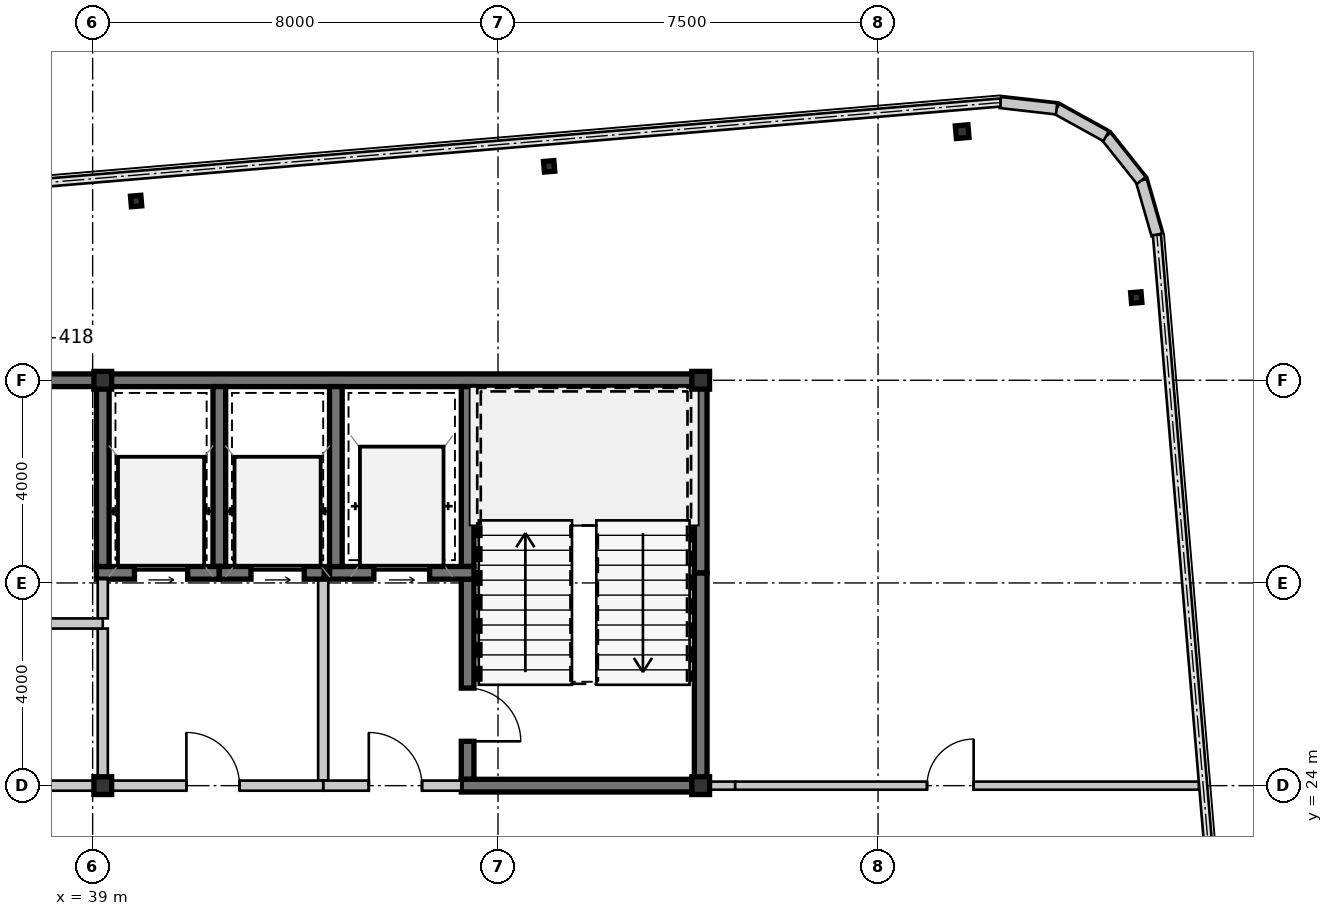
"""IFC4 building model, lengths in metres.
Left out: names, types, materials, properties, quantities, classifications, styles, units other than length and angle.
Written with IfcOpenShell. Run it as: python <this file> out.ifc"""

import sys

from ifc_helpers import new_model, si_unit, direction, frame, frame_2d, origin, origin_2d, place, context, subcontext, project, spatial, rectangle, hollow_rectangle, i_section, extrude, source, transform, mapped, element, fill, save


model = new_model("IFC4")
c1 = context("Model", 3, precision=1e-05, world=origin(), true_north=direction((0.0, 1.0)))
c2 = subcontext(c1, "Body", "Model", "MODEL_VIEW")
j1 = project(units=[si_unit("LENGTHUNIT", "METRE"), si_unit("PLANEANGLEUNIT", "RADIAN")], contexts=[c1])
p1 = place(None, origin())
s1 = spatial("IfcSite", under=j1, at=p1, CompositionType="ELEMENT")
p2 = place(p1, origin())
s2 = spatial("IfcBuilding", under=s1, at=p2, CompositionType="ELEMENT")
p3 = place(p2, frame((0.0, 0.0, 172.55)))
s3 = spatial("IfcBuildingStorey", under=s2, at=p3, CompositionType="ELEMENT", Elevation=172.55)
m1 = source(origin(), c2, "Body", "SweptSolid", [
    extrude(hollow_rectangle(XDim=0.35, YDim=0.35, WallThickness=0.016, at=origin_2d()), origin(), (0.0, 0.0, 1.0), 3.15),
])
for number, where, z_axis, x_axis in (
    (1, (39.2, 24.0, 0.0), (0.0, 0.0, 1.0), (1.0, 0.0, 0.0)),
    (2, (51.0, 24.0, 0.0), (0.0, 0.0, 1.0), (1.0, 0.0, 0.0)),
    (3, (39.2, 32.0, 0.0), (0.0, 0.0, 1.0), (1.0, 0.0, 0.0)),
    (4, (51.0, 32.0, 0.0), (0.0, 0.0, 1.0), (1.0, 0.0, 0.0)),
):
    element("IfcColumn", number, at=place(p3, frame(where, z_axis=z_axis, x_axis=x_axis)), inside=s3, PredefinedType="COLUMN", context=c2, shape_type="MappedRepresentation", body=[
        mapped(m1, transform((0.0, 0.0, 0.0), scale=1.0)),
    ])
m2 = source(origin(), c2, "Body", "SweptSolid", [
    extrude(i_section(OverallWidth=0.205, OverallDepth=0.21, WebThickness=0.009, FlangeThickness=0.014, at=origin_2d()), origin(), (0.0, 0.0, 1.0), 3.15),
])
for number, where, z_axis, x_axis in (
    (5, (39.858, 35.537, 0.0), (0.0, 0.0, 1.0), (0.996, 0.084, 0.0)),
    (6, (48.009, 36.221, 0.0), (0.0, 0.0, 1.0), (0.996, 0.084, 0.0)),
):
    element("IfcColumn", number, at=place(p3, frame(where, z_axis=z_axis, x_axis=x_axis)), inside=s3, PredefinedType="COLUMN", context=c2, shape_type="MappedRepresentation", body=[
        mapped(m2, transform((0.0, 0.0, 0.0), scale=1.0)),
    ])
m3 = source(origin(), c2, "Body", "SweptSolid", [
    extrude(hollow_rectangle(XDim=0.25, YDim=0.25, WallThickness=0.01, at=origin_2d()), origin(), (0.0, 0.0, 1.0), 3.15),
])
p4 = place(p3, frame((56.16, 36.906, 0.0), z_axis=(0.0, 0.0, 1.0), x_axis=(0.99649285925, 0.083677843332, 0.0)))
e7 = element("IfcColumn", 7, at=p4, inside=s3, PredefinedType="COLUMN", context=c2, shape_type="MappedRepresentation", body=[
    mapped(m3, transform((0.0, 0.0, 0.0), scale=1.0)),
])
p5 = place(p3, frame((59.596, 33.632, 0.0), z_axis=(0.0, 0.0, 1.0), x_axis=(0.99649285925, 0.083677843332, 0.0)))
e8 = element("IfcColumn", 8, at=p5, inside=s3, PredefinedType="COLUMN", context=c2, shape_type="MappedRepresentation", body=[
    mapped(m2, transform((0.0, 0.0, 0.0), scale=1.0)),
])
m4 = source(origin(), c2, "Body", "SweptSolid", [
    extrude(rectangle(XDim=1.116, YDim=0.22, at=frame_2d((0.558, 0.0))), origin(), (0.0, 0.0, 1.0), 2.93),
])
for number, where, z_axis, x_axis in (
    (9, (60.004, 34.87, 0.0), (0.0, 0.0, 1.0), (-0.277, 0.961, 0.0)),
    (10, (59.696, 35.943, 0.0), (0.0, 0.0, 1.0), (-0.623, 0.782, 0.0)),
    (11, (59.0, 36.816, 0.0), (0.0, 0.0, 1.0), (-0.875, 0.484, 0.0)),
    (12, (58.024, 37.356, 0.0), (0.0, 0.0, 1.0), (-0.994, 0.112, 0.0)),
):
    element("IfcWall", number, at=place(p3, frame(where, z_axis=z_axis, x_axis=x_axis)), inside=s3, PredefinedType="SOLIDWALL", context=c2, shape_type="MappedRepresentation", body=[
        mapped(m4, transform((0.0, 0.0, 0.0), scale=1.0)),
    ])
m5 = source(origin(), c2, "Body", "SweptSolid", [
    extrude(rectangle(XDim=11.2, YDim=0.25, at=frame_2d((5.6, 0.0))), origin(), (0.0, 0.0, 1.0), 2.93),
])
p6 = place(p3, frame((28.0, 32.0, 0.0), z_axis=(0.0, 0.0, 1.0), x_axis=(1.0, 0.0, 0.0)))
e13 = element("IfcWall", 13, at=p6, inside=s3, PredefinedType="SHEAR", context=c2, shape_type="MappedRepresentation", body=[
    mapped(m5, transform((0.0, 0.0, 0.0), scale=1.0)),
])
m6 = source(origin(), c2, "Body", "SweptSolid", [
    extrude(rectangle(XDim=11.925, YDim=0.25, at=frame_2d((5.962, 0.0))), origin(), (0.0, 0.0, 1.0), 2.93),
])
p7 = place(p3, frame((39.2, 32.0, 0.0), z_axis=(0.0, 0.0, 1.0), x_axis=(1.0, 0.0, 0.0)))
e14 = element("IfcWall", 14, at=p7, inside=s3, PredefinedType="SHEAR", context=c2, shape_type="MappedRepresentation", body=[
    mapped(m6, transform((0.0, 0.0, 0.0), scale=1.0)),
])
m7 = source(origin(), c2, "Body", "SweptSolid", [
    extrude(rectangle(XDim=4.075, YDim=0.25, at=frame_2d((2.038, 0.0))), origin(), (0.0, 0.0, 1.0), 2.93),
])
p8 = place(p3, frame((51.0, 24.125, 0.0), z_axis=(0.0, 0.0, 1.0), x_axis=(0.0, 1.0, 0.0)))
e15 = element("IfcWall", 15, at=p8, inside=s3, PredefinedType="SHEAR", context=c2, shape_type="MappedRepresentation", body=[
    mapped(m7, transform((0.0, 0.0, 0.0), scale=1.0)),
])
m8 = source(origin(), c2, "Body", "SweptSolid", [
    extrude(rectangle(XDim=3.675, YDim=0.25, at=frame_2d((1.837, 0.0))), origin(), (0.0, 0.0, 1.0), 2.93),
])
p9 = place(p3, frame((51.0, 28.2, 0.0), z_axis=(0.0, 0.0, 1.0), x_axis=(0.0, 1.0, 0.0)))
e16 = element("IfcWall", 16, at=p9, inside=s3, PredefinedType="SHEAR", context=c2, shape_type="MappedRepresentation", body=[
    mapped(m8, transform((0.0, 0.0, 0.0), scale=1.0)),
])
m9 = source(origin(), c2, "Body", "SweptSolid", [
    extrude(rectangle(XDim=3.55, YDim=0.25, at=frame_2d((1.775, 0.0))), origin(), (0.0, 0.0, 1.0), 2.93),
])
p10 = place(p3, frame((46.4, 31.875, 0.0), z_axis=(0.0, 0.0, 1.0), x_axis=(0.0, -1.0, 0.0)))
e17 = element("IfcWall", 17, at=p10, inside=s3, PredefinedType="SHEAR", context=c2, shape_type="MappedRepresentation", body=[
    mapped(m9, transform((0.0, 0.0, 0.0), scale=1.0)),
])
m10 = source(origin(), c2, "Body", "SweptSolid", [
    extrude(rectangle(XDim=3.95, YDim=0.25, at=frame_2d((1.975, 0.0))), origin(), (0.0, 0.0, 1.0), 2.93),
])
p11 = place(p3, frame((46.4, 28.075, 0.0), z_axis=(0.0, 0.0, 1.0), x_axis=(0.0, -1.0, 0.0)))
e18 = element("IfcWall", 18, at=p11, inside=s3, PredefinedType="SHEAR", context=c2, shape_type="MappedRepresentation", body=[
    mapped(m10, transform((0.0, 0.0, 0.0), scale=1.0)),
])
m11 = source(origin(), c2, "Body", "SweptSolid", [
    extrude(rectangle(XDim=1.05, YDim=2.1, at=frame_2d((0.525, 1.05))), frame((0.0, 0.135, 0.0), z_axis=(0.0, -1.0, 0.0), x_axis=(1.0, 0.0, 0.0)), (0.0, 0.0, 1.0), 0.27),
])
p12 = place(p11, frame((2.15, 0.0, 0.0)))
e19 = element("IfcOpeningElement", 19, at=p12, cuts=e18, PredefinedType="OPENING", context=c2, shape_type="MappedRepresentation", body=[
    mapped(m11, transform((0.0, 0.0, 0.0), scale=1.0)),
])
m12 = source(origin(), c2, "Body", "SweptSolid", [
    extrude(rectangle(XDim=4.85, YDim=0.25, at=frame_2d((2.425, 0.0))), origin(), (0.0, 0.0, 1.0), 2.93),
])
p13 = place(p3, frame((46.275, 24.0, 0.0), z_axis=(0.0, 0.0, 1.0), x_axis=(1.0, 0.0, 0.0)))
e20 = element("IfcWall", 20, at=p13, inside=s3, PredefinedType="SHEAR", context=c2, shape_type="MappedRepresentation", body=[
    mapped(m12, transform((0.0, 0.0, 0.0), scale=1.0)),
])
m13 = source(origin(), c2, "Body", "SweptSolid", [
    extrude(rectangle(XDim=2.85, YDim=0.25, at=frame_2d((1.425, 0.0))), origin(), (0.0, 0.0, 1.0), 2.93),
])
p14 = place(p3, frame((43.675, 28.2, 0.0), z_axis=(0.0, 0.0, 1.0), x_axis=(1.0, 0.0, 0.0)))
e21 = element("IfcWall", 21, at=p14, inside=s3, PredefinedType="SHEAR", context=c2, shape_type="MappedRepresentation", body=[
    mapped(m13, transform((0.0, 0.0, 0.0), scale=1.0)),
])
m14 = source(origin(), c2, "Body", "SweptSolid", [
    extrude(rectangle(XDim=1.1, YDim=2.15, at=frame_2d((0.55, 1.075))), frame((0.0, 0.135, 0.0), z_axis=(0.0, -1.0, 0.0), x_axis=(1.0, 0.0, 0.0)), (0.0, 0.0, 1.0), 0.27),
])
p15 = place(p14, frame((0.875, 0.0, 0.0)))
e22 = element("IfcOpeningElement", 22, at=p15, cuts=e21, PredefinedType="OPENING", context=c2, shape_type="MappedRepresentation", body=[
    mapped(m14, transform((0.0, 0.0, 0.0), scale=1.0)),
])
p16 = place(p3, frame((43.8, 31.875, 0.0), z_axis=(0.0, 0.0, 1.0), x_axis=(0.0, -1.0, 0.0)))
e23 = element("IfcWall", 23, at=p16, inside=s3, PredefinedType="SHEAR", context=c2, shape_type="MappedRepresentation", body=[
    mapped(m9, transform((0.0, 0.0, 0.0), scale=1.0)),
])
m15 = source(origin(), c2, "Body", "SweptSolid", [
    extrude(rectangle(XDim=3.975, YDim=0.2, at=frame_2d((1.987, 0.0))), origin(), (0.0, 0.0, 1.0), 2.93),
])
p17 = place(p3, frame((43.55, 28.075, 0.0), z_axis=(0.0, 0.0, 1.0), x_axis=(0.0, -1.0, 0.0)))
e24 = element("IfcWall", 24, at=p17, inside=s3, PredefinedType="SOLIDWALL", context=c2, shape_type="MappedRepresentation", body=[
    mapped(m15, transform((0.0, 0.0, 0.0), scale=1.0)),
])
m16 = source(origin(), c2, "Body", "SweptSolid", [
    extrude(rectangle(XDim=2.725, YDim=0.2, at=frame_2d((1.362, 0.0))), origin(), (0.0, 0.0, 1.0), 2.397),
])
p18 = place(p3, frame((43.55, 24.0, 0.0), z_axis=(0.0, 0.0, 1.0), x_axis=(1.0, 0.0, 0.0)))
e25 = element("IfcWall", 25, at=p18, inside=s3, PredefinedType="SOLIDWALL", context=c2, shape_type="MappedRepresentation", body=[
    mapped(m16, transform((0.0, 0.0, 0.0), scale=1.0)),
])
m17 = source(origin(), c2, "Body", "SweptSolid", [
    extrude(rectangle(XDim=1.05, YDim=2.1, at=frame_2d((0.525, 1.05))), frame((0.0, 0.11, 0.0), z_axis=(0.0, -1.0, 0.0), x_axis=(1.0, 0.0, 0.0)), (0.0, 0.0, 1.0), 0.22),
])
p19 = place(p18, frame((0.9, 0.0, 0.0)))
e26 = element("IfcOpeningElement", 26, at=p19, cuts=e25, PredefinedType="OPENING", context=c2, shape_type="MappedRepresentation", body=[
    mapped(m17, transform((0.0, 0.0, 0.0), scale=1.0)),
])
p20 = place(p3, frame((41.5, 28.325, 0.0), z_axis=(0.0, 0.0, 1.0), x_axis=(0.0, 1.0, 0.0)))
e27 = element("IfcWall", 27, at=p20, inside=s3, PredefinedType="SHEAR", context=c2, shape_type="MappedRepresentation", body=[
    mapped(m9, transform((0.0, 0.0, 0.0), scale=1.0)),
])
m18 = source(origin(), c2, "Body", "SweptSolid", [
    extrude(rectangle(XDim=2.425, YDim=0.25, at=frame_2d((1.212, 0.0))), origin(), (0.0, 0.0, 1.0), 2.93),
])
p21 = place(p3, frame((39.075, 28.2, 0.0), z_axis=(0.0, 0.0, 1.0), x_axis=(1.0, 0.0, 0.0)))
e28 = element("IfcWall", 28, at=p21, inside=s3, PredefinedType="SHEAR", context=c2, shape_type="MappedRepresentation", body=[
    mapped(m18, transform((0.0, 0.0, 0.0), scale=1.0)),
])
m19 = source(origin(), c2, "Body", "SweptSolid", [
    extrude(rectangle(XDim=1.05, YDim=2.15, at=frame_2d((0.525, 1.075))), frame((0.0, 0.135, 0.0), z_axis=(0.0, -1.0, 0.0), x_axis=(1.0, 0.0, 0.0)), (0.0, 0.0, 1.0), 0.27),
])
p22 = place(p21, frame((0.75, 0.0, 0.0)))
e29 = element("IfcOpeningElement", 29, at=p22, cuts=e28, PredefinedType="OPENING", context=c2, shape_type="MappedRepresentation", body=[
    mapped(m19, transform((0.0, 0.0, 0.0), scale=1.0)),
])
p23 = place(p3, frame((39.2, 31.875, 0.0), z_axis=(0.0, 0.0, 1.0), x_axis=(0.0, -1.0, 0.0)))
e30 = element("IfcWall", 30, at=p23, inside=s3, PredefinedType="SHEAR", context=c2, shape_type="MappedRepresentation", body=[
    mapped(m9, transform((0.0, 0.0, 0.0), scale=1.0)),
])
m20 = source(origin(), c2, "Body", "SweptSolid", [
    extrude(rectangle(XDim=2.07, YDim=0.25, at=frame_2d((1.035, 0.0))), origin(), (0.0, 0.0, 1.0), 2.93),
])
p24 = place(p3, frame((41.5, 28.2, 0.0), z_axis=(0.0, 0.0, 1.0), x_axis=(1.0, 0.0, 0.0)))
e31 = element("IfcWall", 31, at=p24, inside=s3, PredefinedType="SHEAR", context=c2, shape_type="MappedRepresentation", body=[
    mapped(m20, transform((0.0, 0.0, 0.0), scale=1.0)),
])
p25 = place(p24, frame((0.625, 0.0, 0.0)))
e32 = element("IfcOpeningElement", 32, at=p25, cuts=e31, PredefinedType="OPENING", context=c2, shape_type="MappedRepresentation", body=[
    mapped(m19, transform((0.0, 0.0, 0.0), scale=1.0)),
])
m21 = source(origin(), c2, "Body", "SweptSolid", [
    extrude(rectangle(XDim=3.0, YDim=0.2, at=frame_2d((1.5, 0.0))), origin(), (0.0, 0.0, 1.0), 2.47),
])
p26 = place(p3, frame((39.2, 24.1, 0.0), z_axis=(0.0, 0.0, 1.0), x_axis=(0.0, 1.0, 0.0)))
e33 = element("IfcWall", 33, at=p26, inside=s3, PredefinedType="SOLIDWALL", context=c2, shape_type="MappedRepresentation", body=[
    mapped(m21, transform((0.0, 0.0, 0.0), scale=1.0)),
])
m22 = source(origin(), c2, "Body", "SweptSolid", [
    extrude(rectangle(XDim=0.775, YDim=0.2, at=frame_2d((0.387, 0.0))), origin(), (0.0, 0.0, 1.0), 2.47),
])
p27 = place(p3, frame((39.2, 27.3, 0.0), z_axis=(0.0, 0.0, 1.0), x_axis=(0.0, 1.0, 0.0)))
e34 = element("IfcWall", 34, at=p27, inside=s3, PredefinedType="SOLIDWALL", context=c2, shape_type="MappedRepresentation", body=[
    mapped(m22, transform((0.0, 0.0, 0.0), scale=1.0)),
])
m23 = source(origin(), c2, "Body", "SweptSolid", [
    extrude(rectangle(XDim=4.35, YDim=0.2, at=frame_2d((2.175, 0.0))), origin(), (0.0, 0.0, 1.0), 2.397),
])
p28 = place(p3, frame((43.55, 24.0, 0.0), z_axis=(0.0, 0.0, 1.0), x_axis=(-1.0, 0.0, 0.0)))
e35 = element("IfcWall", 35, at=p28, inside=s3, PredefinedType="SOLIDWALL", context=c2, shape_type="MappedRepresentation", body=[
    mapped(m23, transform((0.0, 0.0, 0.0), scale=1.0)),
])
p29 = place(p28, frame((1.65, 0.0, 0.0)))
e36 = element("IfcOpeningElement", 36, at=p29, cuts=e35, PredefinedType="OPENING", context=c2, shape_type="MappedRepresentation", body=[
    mapped(m17, transform((0.0, 0.0, 0.0), scale=1.0)),
])
m24 = source(origin(), c2, "Body", "SweptSolid", [
    extrude(rectangle(XDim=4.05, YDim=0.2, at=frame_2d((2.025, 0.0))), origin(), (0.0, 0.0, 1.0), 2.93),
])
p30 = place(p3, frame((35.15, 27.2, 0.0), z_axis=(0.0, 0.0, 1.0), x_axis=(1.0, 0.0, 0.0)))
e37 = element("IfcWall", 37, at=p30, inside=s3, PredefinedType="SOLIDWALL", context=c2, shape_type="MappedRepresentation", body=[
    mapped(m24, transform((0.0, 0.0, 0.0), scale=1.0)),
])
p31 = place(p30, frame((0.42, 0.0, 0.0)))
e38 = element("IfcOpeningElement", 38, at=p31, cuts=e37, PredefinedType="OPENING", context=c2, shape_type="MappedRepresentation", body=[
    mapped(m17, transform((0.0, 0.0, 0.0), scale=1.0)),
])
m25 = source(origin(), c2, "Body", "SweptSolid", [
    extrude(rectangle(XDim=4.05, YDim=0.2, at=frame_2d((2.025, 0.0))), origin(), (0.0, 0.0, 1.0), 2.47),
])
p32 = place(p3, frame((39.2, 24.0, 0.0), z_axis=(0.0, 0.0, 1.0), x_axis=(-1.0, 0.0, 0.0)))
e39 = element("IfcWall", 39, at=p32, inside=s3, PredefinedType="SOLIDWALL", context=c2, shape_type="MappedRepresentation", body=[
    mapped(m25, transform((0.0, 0.0, 0.0), scale=1.0)),
])
p33 = place(p32, frame((1.5, 0.0, 0.0)))
e40 = element("IfcOpeningElement", 40, at=p33, cuts=e39, PredefinedType="OPENING", context=c2, shape_type="MappedRepresentation", body=[
    mapped(m17, transform((0.0, 0.0, 0.0), scale=1.0)),
])
m26 = source(origin(), c2, "Body", "SweptSolid", [
    extrude(rectangle(XDim=0.556, YDim=0.16, at=frame_2d((0.278, 0.0))), origin(), (0.0, 0.0, 1.0), 2.47),
])
p34 = place(p3, frame((51.125, 24.0, 0.0), z_axis=(0.0, 0.0, 1.0), x_axis=(1.0, 0.0, 0.0)))
e41 = element("IfcWall", 41, at=p34, inside=s3, PredefinedType="PARTITIONING", context=c2, shape_type="MappedRepresentation", body=[
    mapped(m26, transform((0.0, 0.0, 0.0), scale=1.0)),
])
m27 = source(origin(), c2, "Body", "SweptSolid", [
    extrude(rectangle(XDim=9.153, YDim=0.16, at=frame_2d((4.576, 0.0))), origin(), (0.0, 0.0, 1.0), 2.93),
])
p35 = place(p3, frame((51.681, 24.0, 0.0), z_axis=(0.0, 0.0, 1.0), x_axis=(1.0, 0.0, 0.0)))
e42 = element("IfcWall", 42, at=p35, inside=s3, PredefinedType="PARTITIONING", context=c2, shape_type="MappedRepresentation", body=[
    mapped(m27, transform((0.0, 0.0, 0.0), scale=1.0)),
])
m28 = source(origin(), c2, "Body", "SweptSolid", [
    extrude(rectangle(XDim=0.92, YDim=2.1, at=frame_2d((0.46, 1.05))), frame((0.0, 0.09, 0.0), z_axis=(0.0, -1.0, 0.0), x_axis=(1.0, 0.0, 0.0)), (0.0, 0.0, 1.0), 0.18),
])
p36 = place(p35, frame((3.786, 0.0, 0.0)))
e43 = element("IfcOpeningElement", 43, at=p36, cuts=e42, PredefinedType="OPENING", context=c2, shape_type="MappedRepresentation", body=[
    mapped(m28, transform((0.0, 0.0, 0.0), scale=1.0)),
])
m29 = source(origin(), c2, "Body", "SweptSolid", [
    extrude(rectangle(XDim=1.05, YDim=2.1, at=frame_2d((0.525, 1.05))), frame((0.0, 0.025, 0.0), z_axis=(0.0, -1.0, 0.0), x_axis=(1.0, 0.0, 0.0)), (0.0, 0.0, 1.0), 0.05),
])
p37 = place(p12, origin())
e44 = element("IfcDoor", 44, at=p37, inside=s3, OperationType="SINGLE_SWING_RIGHT", PredefinedType="DOOR", context=c2, shape_type="MappedRepresentation", body=[
    mapped(m29, transform((0.0, 0.0, 0.0), scale=1.0)),
])
fill(e19, e44)
m30 = source(origin(), c2, "Body", "SweptSolid", [
    extrude(rectangle(XDim=1.1, YDim=2.15, at=frame_2d((0.55, 1.075))), frame((0.0, 0.025, 0.0), z_axis=(0.0, -1.0, 0.0), x_axis=(1.0, 0.0, 0.0)), (0.0, 0.0, 1.0), 0.05),
])
p38 = place(p15, origin())
e45 = element("IfcDoor", 45, at=p38, inside=s3, OperationType="SLIDING_TO_LEFT", PredefinedType="DOOR", context=c2, shape_type="MappedRepresentation", body=[
    mapped(m30, transform((0.0, 0.0, 0.0), scale=1.0)),
])
fill(e22, e45)
p39 = place(p19, origin())
e46 = element("IfcDoor", 46, at=p39, inside=s3, OperationType="SINGLE_SWING_LEFT", PredefinedType="DOOR", context=c2, shape_type="MappedRepresentation", body=[
    mapped(m29, transform((0.0, 0.0, 0.0), scale=1.0)),
])
fill(e26, e46)
m31 = source(origin(), c2, "Body", "SweptSolid", [
    extrude(rectangle(XDim=1.05, YDim=2.15, at=frame_2d((0.525, 1.075))), frame((0.0, 0.025, 0.0), z_axis=(0.0, -1.0, 0.0), x_axis=(1.0, 0.0, 0.0)), (0.0, 0.0, 1.0), 0.05),
])
p40 = place(p22, origin())
e47 = element("IfcDoor", 47, at=p40, inside=s3, OperationType="SLIDING_TO_LEFT", PredefinedType="DOOR", context=c2, shape_type="MappedRepresentation", body=[
    mapped(m31, transform((0.0, 0.0, 0.0), scale=1.0)),
])
fill(e29, e47)
p41 = place(p25, origin())
e48 = element("IfcDoor", 48, at=p41, inside=s3, OperationType="SLIDING_TO_LEFT", PredefinedType="DOOR", context=c2, shape_type="MappedRepresentation", body=[
    mapped(m31, transform((0.0, 0.0, 0.0), scale=1.0)),
])
fill(e32, e48)
p42 = place(p29, frame((1.05, 0.0, 0.0), z_axis=(0.0, 0.0, 1.0), x_axis=(-1.0, 0.0, 0.0)))
e49 = element("IfcDoor", 49, at=p42, inside=s3, OperationType="SINGLE_SWING_LEFT", PredefinedType="DOOR", context=c2, shape_type="MappedRepresentation", body=[
    mapped(m29, transform((0.0, 0.0, 0.0), scale=1.0)),
])
fill(e36, e49)
m32 = source(origin(), c2, "Body", "SweptSolid", [
    extrude(rectangle(XDim=0.92, YDim=2.1, at=frame_2d((0.46, 1.05))), frame((0.0, 0.025, 0.0), z_axis=(0.0, -1.0, 0.0), x_axis=(1.0, 0.0, 0.0)), (0.0, 0.0, 1.0), 0.05),
])
p43 = place(p36, origin())
e50 = element("IfcDoor", 50, at=p43, inside=s3, OperationType="SINGLE_SWING_RIGHT", PredefinedType="DOOR", context=c2, shape_type="MappedRepresentation", body=[
    mapped(m32, transform((0.0, 0.0, 0.0), scale=1.0)),
])
fill(e43, e50)
save(model, sys.argv[1])
